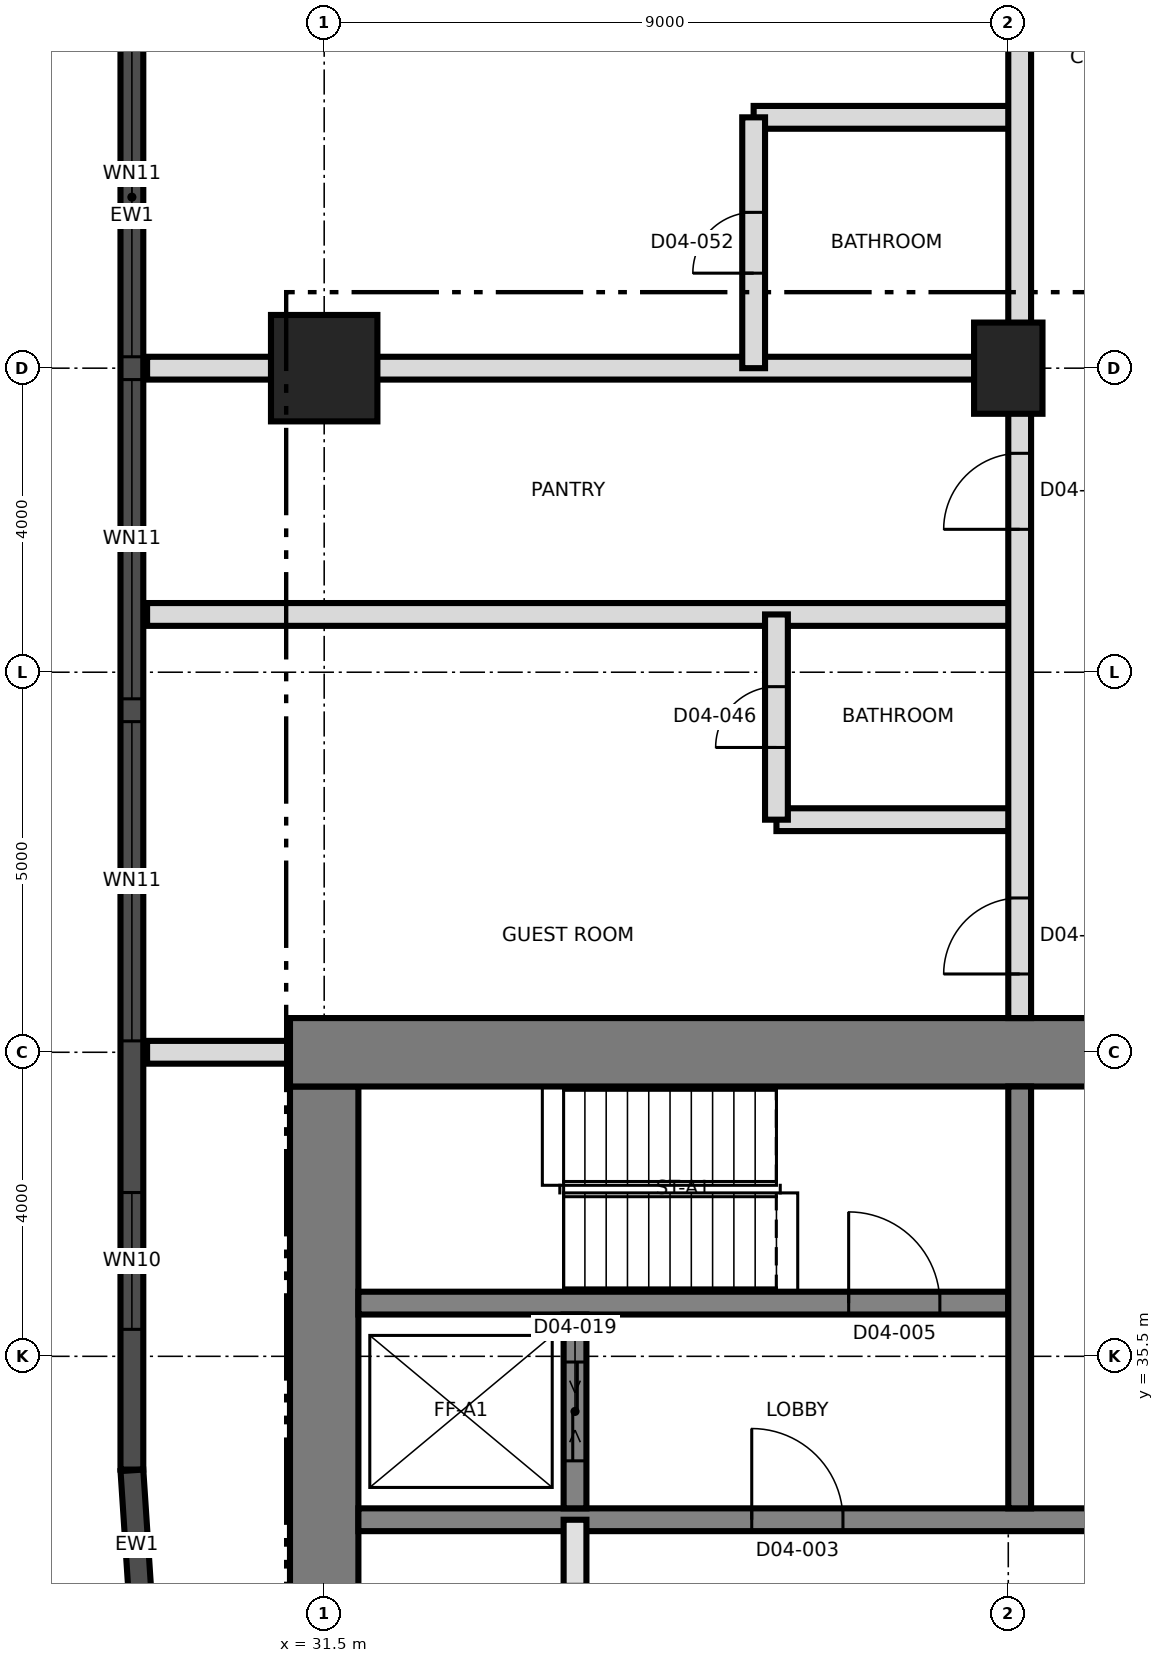
"""IFC4 building model, lengths in metres.
Left out: names, types, materials, properties, quantities, classifications, styles, units other than length and angle.
Written with IfcOpenShell. Run it as: python <this file> out.ifc"""

import sys

from ifc_helpers import new_model, si_unit, direction, frame, frame_2d, origin, origin_2d, place, context, subcontext, project, spatial, rectangle, extrude, element, fill, save


model = new_model("IFC4")
c1 = context("Model", 3, precision=1e-05, world=origin(), true_north=direction((0.0, 1.0)))
c2 = subcontext(c1, "Body", "Model", "MODEL_VIEW")
j1 = project(units=[si_unit("LENGTHUNIT", "METRE"), si_unit("PLANEANGLEUNIT", "RADIAN")], contexts=[c1])
p1 = place(None, origin())
s1 = spatial("IfcSite", under=j1, at=p1, CompositionType="ELEMENT")
p2 = place(p1, origin())
s2 = spatial("IfcBuilding", under=s1, at=p2, CompositionType="ELEMENT")
p3 = place(p2, frame((0.0, 0.0, 63.1)))
s3 = spatial("IfcBuildingStorey", under=s2, at=p3, CompositionType="ELEMENT", Elevation=63.1)
p4 = place(p3, frame((31.5, 21.95, 0.0), z_axis=(0.0, 0.0, 1.0), x_axis=(0.0, 1.0, 0.0)))
e1 = element("IfcWall", 1, at=p4, inside=s3, PredefinedType="SHEAR", context=c2, shape_type="SweptSolid", body=[
    extrude(rectangle(XDim=17.1, YDim=0.9, at=frame_2d((8.55, 0.0))), origin(), (0.0, 0.0, 1.0), 3.7),
])
p5 = place(p3, frame((31.05, 39.5, 0.0), z_axis=(0.0, 0.0, 1.0), x_axis=(1.0, 0.0, 0.0)))
e2 = element("IfcWall", 2, at=p5, inside=s3, PredefinedType="SHEAR", context=c2, shape_type="SweptSolid", body=[
    extrude(rectangle(XDim=27.0, YDim=0.9, at=frame_2d((13.5, 0.0))), origin(), (0.0, 0.0, 1.0), 3.7),
])
p6 = place(p5, frame((10.65, 0.0, 0.0)))
e3 = element("IfcOpeningElement", 3, at=p6, cuts=e2, PredefinedType="OPENING", context=c2, shape_type="SweptSolid", body=[
    extrude(rectangle(XDim=1.2, YDim=2.1, at=frame_2d((0.6, 1.05))), frame((0.0, 0.46, 0.0), z_axis=(0.0, -1.0, 0.0), x_axis=(1.0, 0.0, 0.0)), (0.0, 0.0, 1.0), 0.92),
])
p7 = place(p3, frame((31.95, 33.35, 0.0), z_axis=(0.0, 0.0, 1.0), x_axis=(1.0, 0.0, 0.0)))
e4 = element("IfcWall", 4, at=p7, inside=s3, PredefinedType="SHEAR", context=c2, shape_type="SweptSolid", body=[
    extrude(rectangle(XDim=26.1, YDim=0.3, at=frame_2d((13.05, 0.0))), origin(), (0.0, 0.0, 1.0), 3.7),
])
p8 = place(p7, frame((13.7, 0.0, 0.0)))
e5 = element("IfcOpeningElement", 5, at=p8, cuts=e4, PredefinedType="OPENING", context=c2, shape_type="SweptSolid", body=[
    extrude(rectangle(XDim=1.4, YDim=2.1, at=frame_2d((0.7, 1.05))), frame((0.0, 0.16, 0.0), z_axis=(0.0, -1.0, 0.0), x_axis=(1.0, 0.0, 0.0)), (0.0, 0.0, 1.0), 0.32),
])
p9 = place(p7, frame((5.175, 0.0, 0.0)))
e6 = element("IfcOpeningElement", 6, at=p9, cuts=e4, PredefinedType="OPENING", context=c2, shape_type="SweptSolid", body=[
    extrude(rectangle(XDim=1.2, YDim=2.1, at=frame_2d((0.6, 1.05))), frame((0.0, 0.16, 0.0), z_axis=(0.0, -1.0, 0.0), x_axis=(1.0, 0.0, 0.0)), (0.0, 0.0, 1.0), 0.32),
])
p10 = place(p7, frame((19.725, 0.0, 0.0)))
e7 = element("IfcOpeningElement", 7, at=p10, cuts=e4, PredefinedType="OPENING", context=c2, shape_type="SweptSolid", body=[
    extrude(rectangle(XDim=1.2, YDim=2.1, at=frame_2d((0.6, 1.05))), frame((0.0, 0.16, 0.0), z_axis=(0.0, -1.0, 0.0), x_axis=(1.0, 0.0, 0.0)), (0.0, 0.0, 1.0), 0.32),
])
p11 = place(p3, frame((31.95, 36.2, 0.0), z_axis=(0.0, 0.0, 1.0), x_axis=(1.0, 0.0, 0.0)))
e8 = element("IfcWall", 8, at=p11, inside=s3, PredefinedType="SHEAR", context=c2, shape_type="SweptSolid", body=[
    extrude(rectangle(XDim=8.55, YDim=0.3, at=frame_2d((4.275, 0.0))), origin(), (0.0, 0.0, 1.0), 3.7),
])
p12 = place(p11, frame((6.45, 0.0, 0.0)))
e9 = element("IfcOpeningElement", 9, at=p12, cuts=e8, PredefinedType="OPENING", context=c2, shape_type="SweptSolid", body=[
    extrude(rectangle(XDim=1.2, YDim=2.1, at=frame_2d((0.6, 1.05))), frame((0.0, 0.16, 0.0), z_axis=(0.0, -1.0, 0.0), x_axis=(1.0, 0.0, 0.0)), (0.0, 0.0, 1.0), 0.32),
])
p13 = place(p3, frame((40.65, 33.5, 0.0), z_axis=(0.0, 0.0, 1.0), x_axis=(0.0, 1.0, 0.0)))
e10 = element("IfcWall", 10, at=p13, inside=s3, PredefinedType="SHEAR", context=c2, shape_type="SweptSolid", body=[
    extrude(rectangle(XDim=5.55, YDim=0.3, at=frame_2d((2.775, 0.0))), origin(), (0.0, 0.0, 1.0), 3.7),
])
p14 = place(p3, frame((34.8, 33.5, 0.0), z_axis=(0.0, 0.0, 1.0), x_axis=(0.0, 1.0, 0.0)))
e11 = element("IfcWall", 11, at=p14, inside=s3, PredefinedType="SHEAR", context=c2, shape_type="SweptSolid", body=[
    extrude(rectangle(XDim=2.55, YDim=0.3, at=frame_2d((1.275, 0.0))), origin(), (0.0, 0.0, 1.0), 3.7),
])
p15 = place(p14, frame((0.625, 0.0, 0.0)))
e12 = element("IfcOpeningElement", 12, at=p15, cuts=e11, PredefinedType="OPENING", context=c2, shape_type="SweptSolid", body=[
    extrude(rectangle(XDim=1.3, YDim=2.4, at=frame_2d((0.65, 1.2))), frame((0.0, 0.16, 0.0), z_axis=(0.0, -1.0, 0.0), x_axis=(1.0, 0.0, 0.0)), (0.0, 0.0, 1.0), 0.32),
])
p16 = place(p3, frame((31.5, 48.5, 0.0), z_axis=(0.0, 0.0, 1.0), x_axis=(1.0, 0.0, 0.0)))
e13 = element("IfcColumn", 13, at=p16, inside=s3, PredefinedType="COLUMN", context=c2, shape_type="SweptSolid", body=[
    extrude(rectangle(XDim=1.4, YDim=1.4, at=origin_2d()), origin(), (0.0, 0.0, 1.0), 3.7),
])
p17 = place(p3, frame((40.5, 48.5, 0.0), z_axis=(0.0, 0.0, 1.0), x_axis=(0.0, 1.0, 0.0)))
e14 = element("IfcColumn", 14, at=p17, inside=s3, PredefinedType="COLUMN", context=c2, shape_type="SweptSolid", body=[
    extrude(rectangle(XDim=1.2, YDim=0.9, at=origin_2d()), origin(), (0.0, 0.0, 1.0), 3.7),
])
p18 = place(p3, frame((28.97, 66.986, 0.0), z_axis=(0.0, 0.0, 1.0), x_axis=(0.0, -1.0, 0.0)))
e15 = element("IfcWall", 15, at=p18, inside=s3, PredefinedType="SOLIDWALL", context=c2, shape_type="SweptSolid", body=[
    extrude(rectangle(XDim=32.976, YDim=0.3, at=frame_2d((16.488, 0.0))), origin(), (0.0, 0.0, 1.0), 3.4),
])
p19 = place(p18, frame((1.593, 0.0, 0.3)))
e16 = element("IfcOpeningElement", 16, at=p19, cuts=e15, PredefinedType="OPENING", context=c2, shape_type="SweptSolid", body=[
    extrude(rectangle(XDim=1.8, YDim=2.4, at=frame_2d((0.9, 1.2))), frame((0.0, 0.16, 0.0), z_axis=(0.0, -1.0, 0.0), x_axis=(1.0, 0.0, 0.0)), (0.0, 0.0, 1.0), 0.32),
])
p20 = place(p18, frame((5.136, 0.0, 0.9)))
e17 = element("IfcOpeningElement", 17, at=p20, cuts=e15, PredefinedType="OPENING", context=c2, shape_type="SweptSolid", body=[
    extrude(rectangle(XDim=4.2, YDim=1.5, at=frame_2d((2.1, 0.75))), frame((0.0, 0.16, 0.0), z_axis=(0.0, -1.0, 0.0), x_axis=(1.0, 0.0, 0.0)), (0.0, 0.0, 1.0), 0.32),
])
p21 = place(p18, frame((9.636, 0.0, 0.9)))
e18 = element("IfcOpeningElement", 18, at=p21, cuts=e15, PredefinedType="OPENING", context=c2, shape_type="SweptSolid", body=[
    extrude(rectangle(XDim=4.2, YDim=1.5, at=frame_2d((2.1, 0.75))), frame((0.0, 0.16, 0.0), z_axis=(0.0, -1.0, 0.0), x_axis=(1.0, 0.0, 0.0)), (0.0, 0.0, 1.0), 0.32),
])
p22 = place(p18, frame((14.136, 0.0, 0.9)))
e19 = element("IfcOpeningElement", 19, at=p22, cuts=e15, PredefinedType="OPENING", context=c2, shape_type="SweptSolid", body=[
    extrude(rectangle(XDim=4.2, YDim=1.5, at=frame_2d((2.1, 0.75))), frame((0.0, 0.16, 0.0), z_axis=(0.0, -1.0, 0.0), x_axis=(1.0, 0.0, 0.0)), (0.0, 0.0, 1.0), 0.32),
])
p23 = place(p18, frame((18.636, 0.0, 0.9)))
e20 = element("IfcOpeningElement", 20, at=p23, cuts=e15, PredefinedType="OPENING", context=c2, shape_type="SweptSolid", body=[
    extrude(rectangle(XDim=4.2, YDim=1.5, at=frame_2d((2.1, 0.75))), frame((0.0, 0.16, 0.0), z_axis=(0.0, -1.0, 0.0), x_axis=(1.0, 0.0, 0.0)), (0.0, 0.0, 1.0), 0.32),
])
p24 = place(p18, frame((23.136, 0.0, 0.9)))
e21 = element("IfcOpeningElement", 21, at=p24, cuts=e15, PredefinedType="OPENING", context=c2, shape_type="SweptSolid", body=[
    extrude(rectangle(XDim=4.2, YDim=1.5, at=frame_2d((2.1, 0.75))), frame((0.0, 0.16, 0.0), z_axis=(0.0, -1.0, 0.0), x_axis=(1.0, 0.0, 0.0)), (0.0, 0.0, 1.0), 0.32),
])
p25 = place(p18, frame((29.331, 0.0, 0.3)))
e22 = element("IfcOpeningElement", 22, at=p25, cuts=e15, PredefinedType="OPENING", context=c2, shape_type="SweptSolid", body=[
    extrude(rectangle(XDim=1.8, YDim=2.4, at=frame_2d((0.9, 1.2))), frame((0.0, 0.16, 0.0), z_axis=(0.0, -1.0, 0.0), x_axis=(1.0, 0.0, 0.0)), (0.0, 0.0, 1.0), 0.32),
])
p26 = place(p3, frame((28.97, 34.0, 0.0), z_axis=(0.0, 0.0, 1.0), x_axis=(0.065400645538, -0.997859086025, 0.0)))
e23 = element("IfcWall", 23, at=p26, inside=s3, PredefinedType="SOLIDWALL", context=c2, shape_type="SweptSolid", body=[
    extrude(rectangle(XDim=1.956, YDim=0.3, at=frame_2d((0.978, 0.0))), origin(), (0.0, 0.0, 1.0), 3.4),
])
p27 = place(p3, frame((34.8, 27.9, 0.0), z_axis=(0.0, 0.0, 1.0), x_axis=(0.0, 1.0, 0.0)))
e24 = element("IfcWall", 24, at=p27, inside=s3, PredefinedType="SOLIDWALL", context=c2, shape_type="SweptSolid", body=[
    extrude(rectangle(XDim=5.45, YDim=0.3, at=frame_2d((2.725, 0.0))), origin(), (0.0, 0.0, 1.0), 3.4),
])
p28 = place(p27, frame((3.6, 0.0, 0.0)))
e25 = element("IfcOpeningElement", 25, at=p28, cuts=e24, PredefinedType="OPENING", context=c2, shape_type="SweptSolid", body=[
    extrude(rectangle(XDim=1.0, YDim=2.1, at=frame_2d((0.5, 1.05))), frame((0.0, 0.16, 0.0), z_axis=(0.0, -1.0, 0.0), x_axis=(1.0, 0.0, 0.0)), (0.0, 0.0, 1.0), 0.32),
])
p29 = place(p3, frame((29.17, 39.5, 0.0), z_axis=(0.0, 0.0, 1.0), x_axis=(1.0, 0.0, 0.0)))
e26 = element("IfcWall", 26, at=p29, inside=s3, PredefinedType="PARTITIONING", context=c2, shape_type="SweptSolid", body=[
    extrude(rectangle(XDim=1.86, YDim=0.3, at=frame_2d((0.93, 0.0))), origin(), (0.0, 0.0, 1.0), 3.4),
])
p30 = place(p3, frame((37.45, 42.56, 0.0), z_axis=(0.0, 0.0, 1.0), x_axis=(1.0, 0.0, 0.0)))
e27 = element("IfcWall", 27, at=p30, inside=s3, PredefinedType="PARTITIONING", context=c2, shape_type="SweptSolid", body=[
    extrude(rectangle(XDim=3.2, YDim=0.3, at=frame_2d((1.6, 0.0))), origin(), (0.0, 0.0, 1.0), 3.4),
])
for number, where, z_axis, x_axis in (
    (28, (29.17, 45.26, 0.0), (0.0, 0.0, 1.0), (1.0, 0.0, 0.0)),
    (29, (29.17, 48.5, 0.0), (0.0, 0.0, 1.0), (1.0, 0.0, 0.0)),
):
    element("IfcWall", number, at=place(p3, frame(where, z_axis=z_axis, x_axis=x_axis)), inside=s3, PredefinedType="PARTITIONING", context=c2, shape_type="SweptSolid", body=[
        extrude(rectangle(XDim=11.48, YDim=0.3, at=frame_2d((5.74, 0.0))), origin(), (0.0, 0.0, 1.0), 3.4),
    ])
p31 = place(p3, frame((37.15, 51.8, 0.0), z_axis=(0.0, 0.0, 1.0), x_axis=(1.0, 0.0, 0.0)))
e30 = element("IfcWall", 30, at=p31, inside=s3, PredefinedType="PARTITIONING", context=c2, shape_type="SweptSolid", body=[
    extrude(rectangle(XDim=3.5, YDim=0.3, at=frame_2d((1.75, 0.0))), origin(), (0.0, 0.0, 1.0), 3.4),
])
p32 = place(p3, frame((37.15, 48.5, 0.0), z_axis=(0.0, 0.0, 1.0), x_axis=(0.0, 1.0, 0.0)))
e31 = element("IfcWall", 31, at=p32, inside=s3, PredefinedType="PARTITIONING", context=c2, shape_type="SweptSolid", body=[
    extrude(rectangle(XDim=3.3, YDim=0.3, at=frame_2d((1.65, 0.0))), origin(), (0.0, 0.0, 1.0), 3.4),
])
p33 = place(p32, frame((1.25, 0.0, 0.0)))
e32 = element("IfcOpeningElement", 32, at=p33, cuts=e31, PredefinedType="OPENING", context=c2, shape_type="SweptSolid", body=[
    extrude(rectangle(XDim=0.8, YDim=2.1, at=frame_2d((0.4, 1.05))), frame((0.0, 0.16, 0.0), z_axis=(0.0, -1.0, 0.0), x_axis=(1.0, 0.0, 0.0)), (0.0, 0.0, 1.0), 0.32),
])
p34 = place(p3, frame((37.45, 42.56, 0.0), z_axis=(0.0, 0.0, 1.0), x_axis=(0.0, 1.0, 0.0)))
e33 = element("IfcWall", 33, at=p34, inside=s3, PredefinedType="PARTITIONING", context=c2, shape_type="SweptSolid", body=[
    extrude(rectangle(XDim=2.7, YDim=0.3, at=frame_2d((1.35, 0.0))), origin(), (0.0, 0.0, 1.0), 3.4),
])
p35 = place(p34, frame((0.95, 0.0, 0.0)))
e34 = element("IfcOpeningElement", 34, at=p35, cuts=e33, PredefinedType="OPENING", context=c2, shape_type="SweptSolid", body=[
    extrude(rectangle(XDim=0.8, YDim=2.1, at=frame_2d((0.4, 1.05))), frame((0.0, 0.16, 0.0), z_axis=(0.0, -1.0, 0.0), x_axis=(1.0, 0.0, 0.0)), (0.0, 0.0, 1.0), 0.32),
])
p36 = place(p3, frame((40.65, 39.95, 0.0), z_axis=(0.0, 0.0, 1.0), x_axis=(0.0, 1.0, 0.0)))
e35 = element("IfcWall", 35, at=p36, inside=s3, PredefinedType="PARTITIONING", context=c2, shape_type="SweptSolid", body=[
    extrude(rectangle(XDim=37.05, YDim=0.3, at=frame_2d((18.525, 0.0))), origin(), (0.0, 0.0, 1.0), 3.4),
])
p37 = place(p36, frame((0.58, 0.0, 0.0)))
e36 = element("IfcOpeningElement", 36, at=p37, cuts=e35, PredefinedType="OPENING", context=c2, shape_type="SweptSolid", body=[
    extrude(rectangle(XDim=1.0, YDim=2.1, at=frame_2d((0.5, 1.05))), frame((0.0, 0.16, 0.0), z_axis=(0.0, -1.0, 0.0), x_axis=(1.0, 0.0, 0.0)), (0.0, 0.0, 1.0), 0.32),
])
p38 = place(p36, frame((6.43, 0.0, 0.0)))
e37 = element("IfcOpeningElement", 37, at=p38, cuts=e35, PredefinedType="OPENING", context=c2, shape_type="SweptSolid", body=[
    extrude(rectangle(XDim=1.0, YDim=2.1, at=frame_2d((0.5, 1.05))), frame((0.0, 0.16, 0.0), z_axis=(0.0, -1.0, 0.0), x_axis=(1.0, 0.0, 0.0)), (0.0, 0.0, 1.0), 0.32),
])
p39 = place(p36, frame((14.2, 0.0, 0.0)))
e38 = element("IfcOpeningElement", 38, at=p39, cuts=e35, PredefinedType="OPENING", context=c2, shape_type="SweptSolid", body=[
    extrude(rectangle(XDim=1.0, YDim=2.4, at=frame_2d((0.5, 1.2))), frame((0.0, 0.16, 0.0), z_axis=(0.0, -1.0, 0.0), x_axis=(1.0, 0.0, 0.0)), (0.0, 0.0, 1.0), 0.32),
])
p40 = place(p36, frame((21.05, 0.0, 0.0)))
e39 = element("IfcOpeningElement", 39, at=p40, cuts=e35, PredefinedType="OPENING", context=c2, shape_type="SweptSolid", body=[
    extrude(rectangle(XDim=1.0, YDim=2.4, at=frame_2d((0.5, 1.2))), frame((0.0, 0.16, 0.0), z_axis=(0.0, -1.0, 0.0), x_axis=(1.0, 0.0, 0.0)), (0.0, 0.0, 1.0), 0.32),
])
p41 = place(p22, origin())
e40 = element("IfcWindow", 40, at=p41, inside=s3, PartitioningType="SINGLE_PANEL", PredefinedType="WINDOW", context=c2, shape_type="SweptSolid", body=[
    extrude(rectangle(XDim=4.2, YDim=1.5, at=frame_2d((2.1, 0.75))), frame((0.0, 0.03, 0.0), z_axis=(0.0, -1.0, 0.0), x_axis=(1.0, 0.0, 0.0)), (0.0, 0.0, 1.0), 0.06),
])
fill(e19, e40)
p42 = place(p23, origin())
e41 = element("IfcWindow", 41, at=p42, inside=s3, PartitioningType="SINGLE_PANEL", PredefinedType="WINDOW", context=c2, shape_type="SweptSolid", body=[
    extrude(rectangle(XDim=4.2, YDim=1.5, at=frame_2d((2.1, 0.75))), frame((0.0, 0.03, 0.0), z_axis=(0.0, -1.0, 0.0), x_axis=(1.0, 0.0, 0.0)), (0.0, 0.0, 1.0), 0.06),
])
fill(e20, e41)
p43 = place(p24, origin())
e42 = element("IfcWindow", 42, at=p43, inside=s3, PartitioningType="SINGLE_PANEL", PredefinedType="WINDOW", context=c2, shape_type="SweptSolid", body=[
    extrude(rectangle(XDim=4.2, YDim=1.5, at=frame_2d((2.1, 0.75))), frame((0.0, 0.03, 0.0), z_axis=(0.0, -1.0, 0.0), x_axis=(1.0, 0.0, 0.0)), (0.0, 0.0, 1.0), 0.06),
])
fill(e21, e42)
p44 = place(p25, origin())
e43 = element("IfcWindow", 43, at=p44, inside=s3, PartitioningType="SINGLE_PANEL", PredefinedType="WINDOW", context=c2, shape_type="SweptSolid", body=[
    extrude(rectangle(XDim=1.8, YDim=2.4, at=frame_2d((0.9, 1.2))), frame((0.0, 0.03, 0.0), z_axis=(0.0, -1.0, 0.0), x_axis=(1.0, 0.0, 0.0)), (0.0, 0.0, 1.0), 0.06),
])
fill(e22, e43)
p45 = place(p9, origin())
e44 = element("IfcDoor", 44, at=p45, inside=s3, OperationType="SINGLE_SWING_LEFT", PredefinedType="DOOR", context=c2, shape_type="SweptSolid", body=[
    extrude(rectangle(XDim=1.2, YDim=2.1, at=frame_2d((0.6, 1.05))), frame((0.0, 0.025, 0.0), z_axis=(0.0, -1.0, 0.0), x_axis=(1.0, 0.0, 0.0)), (0.0, 0.0, 1.0), 0.05),
])
fill(e6, e44)
p46 = place(p12, origin())
e45 = element("IfcDoor", 45, at=p46, inside=s3, OperationType="SINGLE_SWING_RIGHT", PredefinedType="DOOR", context=c2, shape_type="SweptSolid", body=[
    extrude(rectangle(XDim=1.2, YDim=2.1, at=frame_2d((0.6, 1.05))), frame((0.0, 0.025, 0.0), z_axis=(0.0, -1.0, 0.0), x_axis=(1.0, 0.0, 0.0)), (0.0, 0.0, 1.0), 0.05),
])
fill(e9, e45)
p47 = place(p15, origin())
e46 = element("IfcDoor", 46, at=p47, inside=s3, OperationType="SLIDING_TO_LEFT", PredefinedType="DOOR", context=c2, shape_type="SweptSolid", body=[
    extrude(rectangle(XDim=1.3, YDim=2.4, at=frame_2d((0.65, 1.2))), frame((0.0, 0.025, 0.0), z_axis=(0.0, -1.0, 0.0), x_axis=(1.0, 0.0, 0.0)), (0.0, 0.0, 1.0), 0.05),
])
fill(e12, e46)
p48 = place(p35, origin())
e47 = element("IfcDoor", 47, at=p48, inside=s3, OperationType="SINGLE_SWING_LEFT", PredefinedType="DOOR", context=c2, shape_type="SweptSolid", body=[
    extrude(rectangle(XDim=0.8, YDim=2.1, at=frame_2d((0.4, 1.05))), frame((0.0, 0.025, 0.0), z_axis=(0.0, -1.0, 0.0), x_axis=(1.0, 0.0, 0.0)), (0.0, 0.0, 1.0), 0.05),
])
fill(e34, e47)
p49 = place(p37, origin())
e48 = element("IfcDoor", 48, at=p49, inside=s3, OperationType="SINGLE_SWING_RIGHT", PredefinedType="DOOR", context=c2, shape_type="SweptSolid", body=[
    extrude(rectangle(XDim=1.0, YDim=2.1, at=frame_2d((0.5, 1.05))), frame((0.0, 0.025, 0.0), z_axis=(0.0, -1.0, 0.0), x_axis=(1.0, 0.0, 0.0)), (0.0, 0.0, 1.0), 0.05),
])
fill(e36, e48)
p50 = place(p38, origin())
e49 = element("IfcDoor", 49, at=p50, inside=s3, OperationType="SINGLE_SWING_LEFT", PredefinedType="DOOR", context=c2, shape_type="SweptSolid", body=[
    extrude(rectangle(XDim=1.0, YDim=2.1, at=frame_2d((0.5, 1.05))), frame((0.0, 0.025, 0.0), z_axis=(0.0, -1.0, 0.0), x_axis=(1.0, 0.0, 0.0)), (0.0, 0.0, 1.0), 0.05),
])
fill(e37, e49)
p51 = place(p33, origin())
e50 = element("IfcDoor", 50, at=p51, inside=s3, OperationType="SINGLE_SWING_LEFT", PredefinedType="DOOR", context=c2, shape_type="SweptSolid", body=[
    extrude(rectangle(XDim=0.8, YDim=2.1, at=frame_2d((0.4, 1.05))), frame((0.0, 0.025, 0.0), z_axis=(0.0, -1.0, 0.0), x_axis=(1.0, 0.0, 0.0)), (0.0, 0.0, 1.0), 0.05),
])
fill(e32, e50)
save(model, sys.argv[1])
